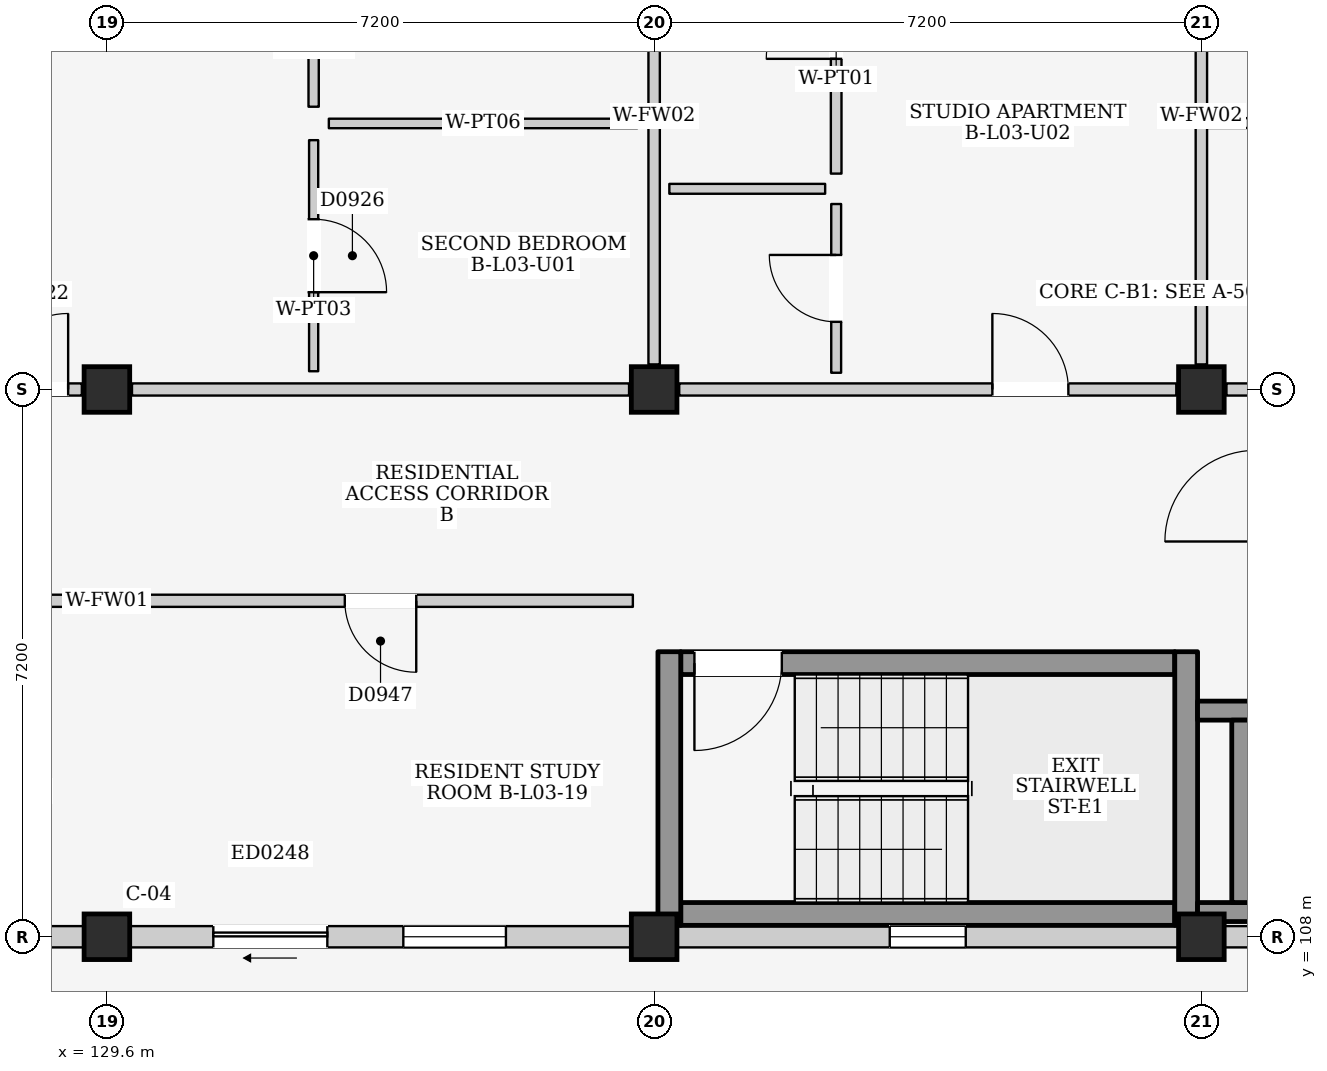
"""IFC4 building model, lengths in metres.
Left out: names, types, materials, properties, quantities, classifications, styles, units other than length and angle.
Written with IfcOpenShell. Run it as: python <this file> out.ifc"""

import sys

from ifc_helpers import new_model, si_unit, direction, frame, frame_2d, origin, origin_2d, place, context, subcontext, project, spatial, rectangle, extrude, element, fill, save


model = new_model("IFC4")
c1 = context("Model", 3, precision=1e-05, world=origin(), true_north=direction((0.0, 1.0)))
c2 = subcontext(c1, "Body", "Model", "MODEL_VIEW")
j1 = project(units=[si_unit("LENGTHUNIT", "METRE"), si_unit("PLANEANGLEUNIT", "RADIAN")], contexts=[c1])
p1 = place(None, origin())
s1 = spatial("IfcSite", under=j1, at=p1, CompositionType="ELEMENT")
p2 = place(p1, origin())
s2 = spatial("IfcBuilding", under=s1, at=p2, CompositionType="ELEMENT")
p3 = place(p2, frame((0.0, 0.0, 12.2)))
s3 = spatial("IfcBuildingStorey", under=s2, at=p3, CompositionType="ELEMENT", Elevation=12.2)
for number, where, z_axis, x_axis in (
    (1, (129.6, 108.0, 0.0), (0.0, 0.0, 1.0), (1.0, 0.0, 0.0)),
    (2, (129.6, 115.2, 0.0), (0.0, 0.0, 1.0), (1.0, 0.0, 0.0)),
    (3, (136.8, 108.0, 0.0), (0.0, 0.0, 1.0), (1.0, 0.0, 0.0)),
    (4, (136.8, 115.2, 0.0), (0.0, 0.0, 1.0), (1.0, 0.0, 0.0)),
    (5, (144.0, 108.0, 0.0), (0.0, 0.0, 1.0), (1.0, 0.0, 0.0)),
    (6, (144.0, 115.2, 0.0), (0.0, 0.0, 1.0), (1.0, 0.0, 0.0)),
):
    element("IfcColumn", number, at=place(p3, frame(where, z_axis=z_axis, x_axis=x_axis)), inside=s3, PredefinedType="COLUMN", context=c2, shape_type="SweptSolid", body=[
        extrude(rectangle(XDim=0.6, YDim=0.6, at=origin_2d()), origin(), (0.0, 0.0, 1.0), 3.2),
    ])
p4 = place(p3, frame((122.7, 108.0, 0.0), z_axis=(0.0, 0.0, 1.0), x_axis=(1.0, 0.0, 0.0)))
e7 = element("IfcWall", 7, at=p4, inside=s3, PredefinedType="ELEMENTEDWALL", context=c2, shape_type="SweptSolid", body=[
    extrude(rectangle(XDim=6.6, YDim=0.28, at=frame_2d((3.3, 0.0))), origin(), (0.0, 0.0, 1.0), 2.365),
])
p5 = place(p4, frame((1.1, 0.0, 0.0)))
e8 = element("IfcOpeningElement", 8, at=p5, cuts=e7, PredefinedType="OPENING", context=c2, shape_type="SweptSolid", body=[
    extrude(rectangle(XDim=1.5, YDim=2.12, at=frame_2d((0.75, 1.06))), frame((0.0, 0.155, 0.0), z_axis=(0.0, -1.0, 0.0), x_axis=(1.0, 0.0, 0.0)), (0.0, 0.0, 1.0), 0.31),
])
p6 = place(p4, frame((3.6, 0.0, 0.755)))
e9 = element("IfcOpeningElement", 9, at=p6, cuts=e7, PredefinedType="OPENING", context=c2, shape_type="SweptSolid", body=[
    extrude(rectangle(XDim=1.35, YDim=1.5, at=frame_2d((0.675, 0.75))), frame((0.0, 0.155, 0.0), z_axis=(0.0, -1.0, 0.0), x_axis=(1.0, 0.0, 0.0)), (0.0, 0.0, 1.0), 0.31),
])
p7 = place(p3, frame((129.9, 108.0, 0.0), z_axis=(0.0, 0.0, 1.0), x_axis=(1.0, 0.0, 0.0)))
e10 = element("IfcWall", 10, at=p7, inside=s3, PredefinedType="ELEMENTEDWALL", context=c2, shape_type="SweptSolid", body=[
    extrude(rectangle(XDim=6.6, YDim=0.28, at=frame_2d((3.3, 0.0))), origin(), (0.0, 0.0, 1.0), 2.365),
])
p8 = place(p7, frame((1.1, 0.0, 0.0)))
e11 = element("IfcOpeningElement", 11, at=p8, cuts=e10, PredefinedType="OPENING", context=c2, shape_type="SweptSolid", body=[
    extrude(rectangle(XDim=1.5, YDim=2.12, at=frame_2d((0.75, 1.06))), frame((0.0, 0.155, 0.0), z_axis=(0.0, -1.0, 0.0), x_axis=(1.0, 0.0, 0.0)), (0.0, 0.0, 1.0), 0.31),
])
p9 = place(p7, frame((3.6, 0.0, 0.755)))
e12 = element("IfcOpeningElement", 12, at=p9, cuts=e10, PredefinedType="OPENING", context=c2, shape_type="SweptSolid", body=[
    extrude(rectangle(XDim=1.35, YDim=1.5, at=frame_2d((0.675, 0.75))), frame((0.0, 0.155, 0.0), z_axis=(0.0, -1.0, 0.0), x_axis=(1.0, 0.0, 0.0)), (0.0, 0.0, 1.0), 0.31),
])
p10 = place(p3, frame((137.1, 108.0, 0.0), z_axis=(0.0, 0.0, 1.0), x_axis=(1.0, 0.0, 0.0)))
e13 = element("IfcWall", 13, at=p10, inside=s3, PredefinedType="ELEMENTEDWALL", context=c2, shape_type="SweptSolid", body=[
    extrude(rectangle(XDim=6.6, YDim=0.28, at=frame_2d((3.3, 0.0))), origin(), (0.0, 0.0, 1.0), 2.365),
])
p11 = place(p10, frame((2.8, 0.0, 1.2)))
e14 = element("IfcOpeningElement", 14, at=p11, cuts=e13, PredefinedType="OPENING", context=c2, shape_type="SweptSolid", body=[
    extrude(rectangle(XDim=1.0, YDim=0.9, at=frame_2d((0.5, 0.45))), frame((0.0, 0.155, 0.0), z_axis=(0.0, -1.0, 0.0), x_axis=(1.0, 0.0, 0.0)), (0.0, 0.0, 1.0), 0.31),
])
p12 = place(p3, frame((144.3, 108.0, 0.0), z_axis=(0.0, 0.0, 1.0), x_axis=(1.0, 0.0, 0.0)))
e15 = element("IfcWall", 15, at=p12, inside=s3, PredefinedType="ELEMENTEDWALL", context=c2, shape_type="SweptSolid", body=[
    extrude(rectangle(XDim=6.6, YDim=0.28, at=frame_2d((3.3, 0.0))), origin(), (0.0, 0.0, 1.0), 2.365),
])
p13 = place(p12, frame((2.8, 0.0, 1.2)))
e16 = element("IfcOpeningElement", 16, at=p13, cuts=e15, PredefinedType="OPENING", context=c2, shape_type="SweptSolid", body=[
    extrude(rectangle(XDim=1.0, YDim=0.9, at=frame_2d((0.5, 0.45))), frame((0.0, 0.155, 0.0), z_axis=(0.0, -1.0, 0.0), x_axis=(1.0, 0.0, 0.0)), (0.0, 0.0, 1.0), 0.31),
])
p14 = place(p3, frame((137.15, 108.3, 0.0), z_axis=(0.0, 0.0, 1.0), x_axis=(1.0, 0.0, 0.0)))
e17 = element("IfcWall", 17, at=p14, inside=s3, PredefinedType="SHEAR", context=c2, shape_type="SweptSolid", body=[
    extrude(rectangle(XDim=6.5, YDim=0.3, at=frame_2d((3.25, 0.0))), origin(), (0.0, 0.0, 1.0), 2.98),
])
p15 = place(p3, frame((137.15, 111.6, 0.0), z_axis=(0.0, 0.0, 1.0), x_axis=(1.0, 0.0, 0.0)))
e18 = element("IfcWall", 18, at=p15, inside=s3, PredefinedType="SHEAR", context=c2, shape_type="SweptSolid", body=[
    extrude(rectangle(XDim=6.5, YDim=0.3, at=frame_2d((3.25, 0.0))), origin(), (0.0, 0.0, 1.0), 2.98),
])
p16 = place(p15, frame((0.18, 0.0, 0.0)))
e19 = element("IfcOpeningElement", 19, at=p16, cuts=e18, PredefinedType="OPENING", context=c2, shape_type="SweptSolid", body=[
    extrude(rectangle(XDim=1.15, YDim=2.2, at=frame_2d((0.575, 1.1))), frame((0.0, 0.165, 0.0), z_axis=(0.0, -1.0, 0.0), x_axis=(1.0, 0.0, 0.0)), (0.0, 0.0, 1.0), 0.33),
])
for number, where, z_axis, x_axis in (
    (20, (137.0, 108.15, 0.0), (0.0, 0.0, 1.0), (0.0, 1.0, 0.0)),
    (21, (143.8, 108.15, 0.0), (0.0, 0.0, 1.0), (0.0, 1.0, 0.0)),
):
    element("IfcWall", number, at=place(p3, frame(where, z_axis=z_axis, x_axis=x_axis)), inside=s3, PredefinedType="SHEAR", context=c2, shape_type="SweptSolid", body=[
        extrude(rectangle(XDim=3.6, YDim=0.3, at=frame_2d((1.8, 0.0))), origin(), (0.0, 0.0, 1.0), 2.98),
    ])
p17 = place(p3, frame((143.95, 108.325, 0.0), z_axis=(0.0, 0.0, 1.0), x_axis=(1.0, 0.0, 0.0)))
e22 = element("IfcWall", 22, at=p17, inside=s3, PredefinedType="SHEAR", context=c2, shape_type="SweptSolid", body=[
    extrude(rectangle(XDim=2.675, YDim=0.25, at=frame_2d((1.337, 0.0))), origin(), (0.0, 0.0, 1.0), 2.98),
])
p18 = place(p3, frame((143.95, 110.975, 0.0), z_axis=(0.0, 0.0, 1.0), x_axis=(1.0, 0.0, 0.0)))
e23 = element("IfcWall", 23, at=p18, inside=s3, PredefinedType="SHEAR", context=c2, shape_type="SweptSolid", body=[
    extrude(rectangle(XDim=2.675, YDim=0.25, at=frame_2d((1.337, 0.0))), origin(), (0.0, 0.0, 1.0), 2.98),
])
p19 = place(p18, frame((1.0, 0.0, 0.0)))
e24 = element("IfcOpeningElement", 24, at=p19, cuts=e23, PredefinedType="OPENING", context=c2, shape_type="SweptSolid", body=[
    extrude(rectangle(XDim=1.2, YDim=2.25, at=frame_2d((0.6, 1.125))), frame((0.0, 0.14, 0.0), z_axis=(0.0, -1.0, 0.0), x_axis=(1.0, 0.0, 0.0)), (0.0, 0.0, 1.0), 0.28),
])
p20 = place(p3, frame((144.525, 108.45, 0.0), z_axis=(0.0, 0.0, 1.0), x_axis=(0.0, 1.0, 0.0)))
e25 = element("IfcWall", 25, at=p20, inside=s3, PredefinedType="SHEAR", context=c2, shape_type="SweptSolid", body=[
    extrude(rectangle(XDim=2.4, YDim=0.25, at=frame_2d((1.2, 0.0))), origin(), (0.0, 0.0, 1.0), 2.98),
])
p21 = place(p3, frame((122.73, 115.2, 0.0), z_axis=(0.0, 0.0, 1.0), x_axis=(1.0, 0.0, 0.0)))
e26 = element("IfcWall", 26, at=p21, inside=s3, PredefinedType="PARTITIONING", context=c2, shape_type="SweptSolid", body=[
    extrude(rectangle(XDim=6.54, YDim=0.16, at=frame_2d((3.27, 0.0))), origin(), (0.0, 0.0, 1.0), 2.365),
])
p22 = place(p21, frame((5.36, 0.0, 0.0)))
e27 = element("IfcOpeningElement", 27, at=p22, cuts=e26, PredefinedType="OPENING", context=c2, shape_type="SweptSolid", body=[
    extrude(rectangle(XDim=1.0, YDim=2.15, at=frame_2d((0.5, 1.075))), frame((0.0, 0.095, 0.0), z_axis=(0.0, -1.0, 0.0), x_axis=(1.0, 0.0, 0.0)), (0.0, 0.0, 1.0), 0.19),
])
p23 = place(p3, frame((129.93, 115.2, 0.0), z_axis=(0.0, 0.0, 1.0), x_axis=(1.0, 0.0, 0.0)))
e28 = element("IfcWall", 28, at=p23, inside=s3, PredefinedType="PARTITIONING", context=c2, shape_type="SweptSolid", body=[
    extrude(rectangle(XDim=6.54, YDim=0.16, at=frame_2d((3.27, 0.0))), origin(), (0.0, 0.0, 1.0), 2.365),
])
p24 = place(p3, frame((136.8, 115.53, 0.0), z_axis=(0.0, 0.0, 1.0), x_axis=(0.0, 1.0, 0.0)))
e29 = element("IfcWall", 29, at=p24, inside=s3, PredefinedType="PARTITIONING", context=c2, shape_type="SweptSolid", body=[
    extrude(rectangle(XDim=6.54, YDim=0.15, at=frame_2d((3.27, 0.0))), origin(), (0.0, 0.0, 1.0), 2.415),
])
p25 = place(p3, frame((132.32, 118.92, 0.0), z_axis=(0.0, 0.0, 1.0), x_axis=(0.0, 1.0, 0.0)))
e30 = element("IfcWall", 30, at=p25, inside=s3, PredefinedType="PARTITIONING", context=c2, shape_type="SweptSolid", body=[
    extrude(rectangle(XDim=3.04, YDim=0.135, at=frame_2d((1.52, 0.0))), origin(), (0.0, 0.0, 1.0), 2.98),
])
p26 = place(p25, frame((1.045, 0.0, 0.0)))
e31 = element("IfcOpeningElement", 31, at=p26, cuts=e30, PredefinedType="OPENING", context=c2, shape_type="SweptSolid", body=[
    extrude(rectangle(XDim=0.95, YDim=2.15, at=frame_2d((0.475, 1.075))), frame((0.0, 0.083, 0.0), z_axis=(0.0, -1.0, 0.0), x_axis=(1.0, 0.0, 0.0)), (0.0, 0.0, 1.0), 0.165),
])
p27 = place(p3, frame((132.52, 118.7, 0.0), z_axis=(0.0, 0.0, 1.0), x_axis=(1.0, 0.0, 0.0)))
e32 = element("IfcWall", 32, at=p27, inside=s3, PredefinedType="PARTITIONING", context=c2, shape_type="SweptSolid", body=[
    extrude(rectangle(XDim=4.06, YDim=0.125, at=frame_2d((2.03, 0.0))), origin(), (0.0, 0.0, 1.0), 2.98),
])
p28 = place(p3, frame((132.32, 115.44, 0.0), z_axis=(0.0, 0.0, 1.0), x_axis=(0.0, 1.0, 0.0)))
e33 = element("IfcWall", 33, at=p28, inside=s3, PredefinedType="PARTITIONING", context=c2, shape_type="SweptSolid", body=[
    extrude(rectangle(XDim=3.04, YDim=0.12, at=frame_2d((1.52, 0.0))), origin(), (0.0, 0.0, 1.0), 2.98),
])
p29 = place(p28, frame((1.04, 0.0, 0.0)))
e34 = element("IfcOpeningElement", 34, at=p29, cuts=e33, PredefinedType="OPENING", context=c2, shape_type="SweptSolid", body=[
    extrude(rectangle(XDim=0.96, YDim=2.15, at=frame_2d((0.48, 1.075))), frame((0.0, 0.075, 0.0), z_axis=(0.0, -1.0, 0.0), x_axis=(1.0, 0.0, 0.0)), (0.0, 0.0, 1.0), 0.15),
])
p30 = place(p3, frame((137.13, 115.2, 0.0), z_axis=(0.0, 0.0, 1.0), x_axis=(1.0, 0.0, 0.0)))
e35 = element("IfcWall", 35, at=p30, inside=s3, PredefinedType="PARTITIONING", context=c2, shape_type="SweptSolid", body=[
    extrude(rectangle(XDim=6.54, YDim=0.16, at=frame_2d((3.27, 0.0))), origin(), (0.0, 0.0, 1.0), 2.365),
])
p31 = place(p30, frame((4.12, 0.0, 0.0)))
e36 = element("IfcOpeningElement", 36, at=p31, cuts=e35, PredefinedType="OPENING", context=c2, shape_type="SweptSolid", body=[
    extrude(rectangle(XDim=1.0, YDim=2.15, at=frame_2d((0.5, 1.075))), frame((0.0, 0.095, 0.0), z_axis=(0.0, -1.0, 0.0), x_axis=(1.0, 0.0, 0.0)), (0.0, 0.0, 1.0), 0.19),
])
p32 = place(p3, frame((144.0, 115.53, 0.0), z_axis=(0.0, 0.0, 1.0), x_axis=(0.0, 1.0, 0.0)))
e37 = element("IfcWall", 37, at=p32, inside=s3, PredefinedType="PARTITIONING", context=c2, shape_type="SweptSolid", body=[
    extrude(rectangle(XDim=6.54, YDim=0.15, at=frame_2d((3.27, 0.0))), origin(), (0.0, 0.0, 1.0), 2.415),
])
p33 = place(p3, frame((137.0, 117.84, 0.0), z_axis=(0.0, 0.0, 1.0), x_axis=(1.0, 0.0, 0.0)))
e38 = element("IfcWall", 38, at=p33, inside=s3, PredefinedType="PARTITIONING", context=c2, shape_type="SweptSolid", body=[
    extrude(rectangle(XDim=2.05, YDim=0.13, at=frame_2d((1.025, 0.0))), origin(), (0.0, 0.0, 1.0), 2.98),
])
p34 = place(p3, frame((139.195, 115.42, 0.0), z_axis=(0.0, 0.0, 1.0), x_axis=(0.0, 1.0, 0.0)))
e39 = element("IfcWall", 39, at=p34, inside=s3, PredefinedType="PARTITIONING", context=c2, shape_type="SweptSolid", body=[
    extrude(rectangle(XDim=2.22, YDim=0.13, at=frame_2d((1.11, 0.0))), origin(), (0.0, 0.0, 1.0), 2.98),
])
p35 = place(p34, frame((0.67, 0.0, 0.0)))
e40 = element("IfcOpeningElement", 40, at=p35, cuts=e39, PredefinedType="OPENING", context=c2, shape_type="SweptSolid", body=[
    extrude(rectangle(XDim=0.88, YDim=2.1, at=frame_2d((0.44, 1.05))), frame((0.0, 0.08, 0.0), z_axis=(0.0, -1.0, 0.0), x_axis=(1.0, 0.0, 0.0)), (0.0, 0.0, 1.0), 0.16),
])
p36 = place(p3, frame((139.195, 118.04, 0.0), z_axis=(0.0, 0.0, 1.0), x_axis=(0.0, 1.0, 0.0)))
e41 = element("IfcWall", 41, at=p36, inside=s3, PredefinedType="PARTITIONING", context=c2, shape_type="SweptSolid", body=[
    extrude(rectangle(XDim=3.94, YDim=0.14, at=frame_2d((1.97, 0.0))), origin(), (0.0, 0.0, 1.0), 2.98),
])
p37 = place(p36, frame((1.51, 0.0, 0.0)))
e42 = element("IfcOpeningElement", 42, at=p37, cuts=e41, PredefinedType="OPENING", context=c2, shape_type="SweptSolid", body=[
    extrude(rectangle(XDim=0.92, YDim=2.1, at=frame_2d((0.46, 1.05))), frame((0.0, 0.085, 0.0), z_axis=(0.0, -1.0, 0.0), x_axis=(1.0, 0.0, 0.0)), (0.0, 0.0, 1.0), 0.17),
])
p38 = place(p3, frame((144.33, 115.2, 0.0), z_axis=(0.0, 0.0, 1.0), x_axis=(1.0, 0.0, 0.0)))
e43 = element("IfcWall", 43, at=p38, inside=s3, PredefinedType="PARTITIONING", context=c2, shape_type="SweptSolid", body=[
    extrude(rectangle(XDim=6.54, YDim=0.16, at=frame_2d((3.27, 0.0))), origin(), (0.0, 0.0, 1.0), 2.365),
])
p39 = place(p3, frame((144.08, 118.705, 0.0), z_axis=(0.0, 0.0, 1.0), x_axis=(1.0, 0.0, 0.0)))
e44 = element("IfcWall", 44, at=p39, inside=s3, PredefinedType="PARTITIONING", context=c2, shape_type="SweptSolid", body=[
    extrude(rectangle(XDim=2.4, YDim=0.13, at=frame_2d((1.2, 0.0))), origin(), (0.0, 0.0, 1.0), 2.98),
])
p40 = place(p39, frame((0.75, 0.0, 0.0)))
e45 = element("IfcOpeningElement", 45, at=p40, cuts=e44, PredefinedType="OPENING", context=c2, shape_type="SweptSolid", body=[
    extrude(rectangle(XDim=0.9, YDim=2.1, at=frame_2d((0.45, 1.05))), frame((0.0, 0.08, 0.0), z_axis=(0.0, -1.0, 0.0), x_axis=(1.0, 0.0, 0.0)), (0.0, 0.0, 1.0), 0.16),
])
p41 = place(p3, frame((122.68, 112.42, 0.0), z_axis=(0.0, 0.0, 1.0), x_axis=(1.0, 0.0, 0.0)))
e46 = element("IfcWall", 46, at=p41, inside=s3, PredefinedType="PARTITIONING", context=c2, shape_type="SweptSolid", body=[
    extrude(rectangle(XDim=6.64, YDim=0.16, at=frame_2d((3.32, 0.0))), origin(), (0.0, 0.0, 1.0), 2.98),
])
p42 = place(p41, frame((2.85, 0.0, 0.0)))
e47 = element("IfcOpeningElement", 47, at=p42, cuts=e46, PredefinedType="OPENING", context=c2, shape_type="SweptSolid", body=[
    extrude(rectangle(XDim=0.94, YDim=2.12, at=frame_2d((0.47, 1.06))), frame((0.0, 0.095, 0.0), z_axis=(0.0, -1.0, 0.0), x_axis=(1.0, 0.0, 0.0)), (0.0, 0.0, 1.0), 0.19),
])
p43 = place(p3, frame((129.88, 112.42, 0.0), z_axis=(0.0, 0.0, 1.0), x_axis=(1.0, 0.0, 0.0)))
e48 = element("IfcWall", 48, at=p43, inside=s3, PredefinedType="PARTITIONING", context=c2, shape_type="SweptSolid", body=[
    extrude(rectangle(XDim=6.64, YDim=0.16, at=frame_2d((3.32, 0.0))), origin(), (0.0, 0.0, 1.0), 2.98),
])
p44 = place(p43, frame((2.85, 0.0, 0.0)))
e49 = element("IfcOpeningElement", 49, at=p44, cuts=e48, PredefinedType="OPENING", context=c2, shape_type="SweptSolid", body=[
    extrude(rectangle(XDim=0.94, YDim=2.12, at=frame_2d((0.47, 1.06))), frame((0.0, 0.095, 0.0), z_axis=(0.0, -1.0, 0.0), x_axis=(1.0, 0.0, 0.0)), (0.0, 0.0, 1.0), 0.19),
])
p45 = place(p8, frame((1.5, 0.0, 0.0), z_axis=(0.0, 0.0, 1.0), x_axis=(-1.0, 0.0, 0.0)))
e50 = element("IfcDoor", 50, at=p45, inside=s3, OperationType="SLIDING_TO_LEFT", PredefinedType="DOOR", context=c2, shape_type="SweptSolid", body=[
    extrude(rectangle(XDim=1.5, YDim=2.12, at=frame_2d((0.75, 1.06))), frame((0.0, 0.025, 0.0), z_axis=(0.0, -1.0, 0.0), x_axis=(1.0, 0.0, 0.0)), (0.0, 0.0, 1.0), 0.05),
])
fill(e11, e50)
p46 = place(p9, origin())
e51 = element("IfcWindow", 51, at=p46, inside=s3, PartitioningType="SINGLE_PANEL", PredefinedType="WINDOW", context=c2, shape_type="SweptSolid", body=[
    extrude(rectangle(XDim=1.35, YDim=1.5, at=frame_2d((0.675, 0.75))), frame((0.0, 0.03, 0.0), z_axis=(0.0, -1.0, 0.0), x_axis=(1.0, 0.0, 0.0)), (0.0, 0.0, 1.0), 0.06),
])
fill(e12, e51)
p47 = place(p11, origin())
e52 = element("IfcWindow", 52, at=p47, inside=s3, PartitioningType="SINGLE_PANEL", PredefinedType="WINDOW", context=c2, shape_type="SweptSolid", body=[
    extrude(rectangle(XDim=1.0, YDim=0.9, at=frame_2d((0.5, 0.45))), frame((0.0, 0.03, 0.0), z_axis=(0.0, -1.0, 0.0), x_axis=(1.0, 0.0, 0.0)), (0.0, 0.0, 1.0), 0.06),
])
fill(e14, e52)
p48 = place(p16, frame((1.15, 0.0, 0.0), z_axis=(0.0, 0.0, 1.0), x_axis=(-1.0, 0.0, 0.0)))
e53 = element("IfcDoor", 53, at=p48, inside=s3, OperationType="SINGLE_SWING_RIGHT", PredefinedType="DOOR", context=c2, shape_type="SweptSolid", body=[
    extrude(rectangle(XDim=1.15, YDim=2.2, at=frame_2d((0.575, 1.1))), frame((0.0, 0.025, 0.0), z_axis=(0.0, -1.0, 0.0), x_axis=(1.0, 0.0, 0.0)), (0.0, 0.0, 1.0), 0.05),
])
fill(e19, e53)
p49 = place(p22, origin())
e54 = element("IfcDoor", 54, at=p49, inside=s3, OperationType="SINGLE_SWING_RIGHT", PredefinedType="DOOR", context=c2, shape_type="SweptSolid", body=[
    extrude(rectangle(XDim=1.0, YDim=2.15, at=frame_2d((0.5, 1.075))), frame((0.0, 0.025, 0.0), z_axis=(0.0, -1.0, 0.0), x_axis=(1.0, 0.0, 0.0)), (0.0, 0.0, 1.0), 0.05),
])
fill(e27, e54)
p50 = place(p29, frame((0.96, 0.0, 0.0), z_axis=(0.0, 0.0, 1.0), x_axis=(-1.0, 0.0, 0.0)))
e55 = element("IfcDoor", 55, at=p50, inside=s3, OperationType="SINGLE_SWING_RIGHT", PredefinedType="DOOR", context=c2, shape_type="SweptSolid", body=[
    extrude(rectangle(XDim=0.96, YDim=2.15, at=frame_2d((0.48, 1.075))), frame((0.0, 0.025, 0.0), z_axis=(0.0, -1.0, 0.0), x_axis=(1.0, 0.0, 0.0)), (0.0, 0.0, 1.0), 0.05),
])
fill(e34, e55)
p51 = place(p31, origin())
e56 = element("IfcDoor", 56, at=p51, inside=s3, OperationType="SINGLE_SWING_LEFT", PredefinedType="DOOR", context=c2, shape_type="SweptSolid", body=[
    extrude(rectangle(XDim=1.0, YDim=2.15, at=frame_2d((0.5, 1.075))), frame((0.0, 0.025, 0.0), z_axis=(0.0, -1.0, 0.0), x_axis=(1.0, 0.0, 0.0)), (0.0, 0.0, 1.0), 0.05),
])
fill(e36, e56)
p52 = place(p35, origin())
e57 = element("IfcDoor", 57, at=p52, inside=s3, OperationType="SINGLE_SWING_RIGHT", PredefinedType="DOOR", context=c2, shape_type="SweptSolid", body=[
    extrude(rectangle(XDim=0.88, YDim=2.1, at=frame_2d((0.44, 1.05))), frame((0.0, 0.025, 0.0), z_axis=(0.0, -1.0, 0.0), x_axis=(1.0, 0.0, 0.0)), (0.0, 0.0, 1.0), 0.05),
])
fill(e40, e57)
p53 = place(p37, origin())
e58 = element("IfcDoor", 58, at=p53, inside=s3, OperationType="SINGLE_SWING_LEFT", PredefinedType="DOOR", context=c2, shape_type="SweptSolid", body=[
    extrude(rectangle(XDim=0.92, YDim=2.1, at=frame_2d((0.46, 1.05))), frame((0.0, 0.025, 0.0), z_axis=(0.0, -1.0, 0.0), x_axis=(1.0, 0.0, 0.0)), (0.0, 0.0, 1.0), 0.05),
])
fill(e42, e58)
p54 = place(p44, frame((0.94, 0.0, 0.0), z_axis=(0.0, 0.0, 1.0), x_axis=(-1.0, 0.0, 0.0)))
e59 = element("IfcDoor", 59, at=p54, inside=s3, OperationType="SINGLE_SWING_LEFT", PredefinedType="DOOR", context=c2, shape_type="SweptSolid", body=[
    extrude(rectangle(XDim=0.94, YDim=2.12, at=frame_2d((0.47, 1.06))), frame((0.0, 0.025, 0.0), z_axis=(0.0, -1.0, 0.0), x_axis=(1.0, 0.0, 0.0)), (0.0, 0.0, 1.0), 0.05),
])
fill(e49, e59)
save(model, sys.argv[1])
